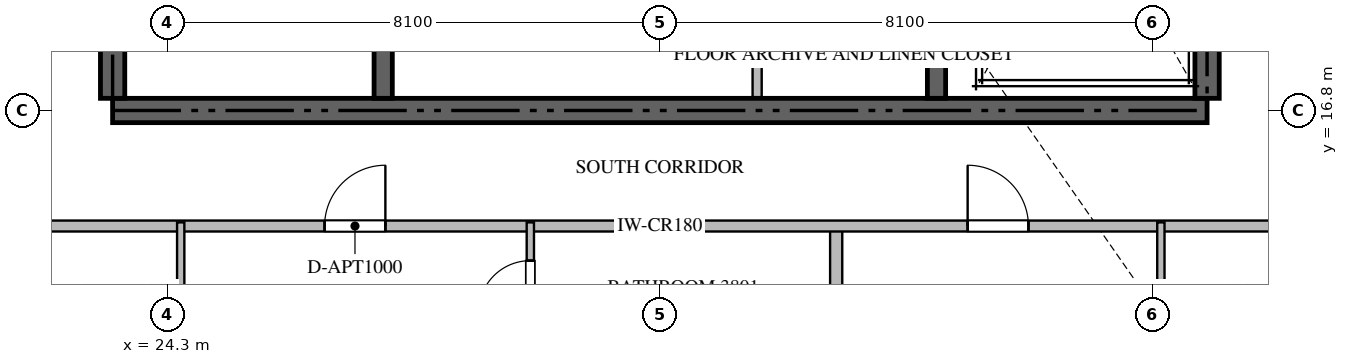
"""IFC4 building model, lengths in metres.
Left out: names, types, materials, properties, quantities, classifications, styles, units other than length and angle.
Written with IfcOpenShell. Run it as: python <this file> out.ifc"""

import sys

from ifc_helpers import new_model, si_unit, direction, frame, frame_2d, origin, place, context, subcontext, project, spatial, rectangle, extrude, source, transform, mapped, element, fill, save


model = new_model("IFC4")
c1 = context("Model", 3, precision=1e-05, world=origin(), true_north=direction((0.0, 1.0)))
c2 = subcontext(c1, "Body", "Model", "MODEL_VIEW")
j1 = project(units=[si_unit("LENGTHUNIT", "METRE"), si_unit("PLANEANGLEUNIT", "RADIAN")], contexts=[c1])
p1 = place(None, origin())
s1 = spatial("IfcSite", under=j1, at=p1, CompositionType="ELEMENT")
p2 = place(p1, origin())
s2 = spatial("IfcBuilding", under=s1, at=p2, CompositionType="ELEMENT")
p3 = place(p2, frame((0.0, 0.0, 153.9)))
s3 = spatial("IfcBuildingStorey", under=s2, at=p3, CompositionType="ELEMENT", Elevation=153.9)
p4 = place(p3, frame((23.4, 16.8, -0.26), z_axis=(0.0, 0.0, 1.0), x_axis=(1.0, 0.0, 0.0)))
e1 = element("IfcWall", 1, at=p4, inside=s3, PredefinedType="SHEAR", context=c2, shape_type="SweptSolid", body=[
    extrude(rectangle(XDim=18.0, YDim=0.4, at=frame_2d((9.0, 0.0))), origin(), (0.0, 0.0, 1.0), 3.748),
])
p5 = place(p3, frame((23.4, 17.0, -0.26), z_axis=(0.0, 0.0, 1.0), x_axis=(0.0, 1.0, 0.0)))
e2 = element("IfcWall", 2, at=p5, inside=s3, PredefinedType="SHEAR", context=c2, shape_type="SweptSolid", body=[
    extrude(rectangle(XDim=4.85, YDim=0.4, at=frame_2d((2.425, 0.0))), origin(), (0.0, 0.0, 1.0), 3.748),
])
p6 = place(p3, frame((41.4, 17.0, -0.26), z_axis=(0.0, 0.0, 1.0), x_axis=(0.0, 1.0, 0.0)))
e3 = element("IfcWall", 3, at=p6, inside=s3, PredefinedType="SHEAR", context=c2, shape_type="SweptSolid", body=[
    extrude(rectangle(XDim=8.35, YDim=0.4, at=frame_2d((4.175, 0.0))), origin(), (0.0, 0.0, 1.0), 3.748),
])
p7 = place(p3, frame((27.85, 17.0, -0.26), z_axis=(0.0, 0.0, 1.0), x_axis=(0.0, 1.0, 0.0)))
e4 = element("IfcWall", 4, at=p7, inside=s3, PredefinedType="SHEAR", context=c2, shape_type="SweptSolid", body=[
    extrude(rectangle(XDim=4.85, YDim=0.3, at=frame_2d((2.425, 0.0))), origin(), (0.0, 0.0, 1.0), 3.748),
])
p8 = place(p3, frame((36.95, 17.0, -0.26), z_axis=(0.0, 0.0, 1.0), x_axis=(0.0, 1.0, 0.0)))
e5 = element("IfcWall", 5, at=p8, inside=s3, PredefinedType="SHEAR", context=c2, shape_type="SweptSolid", body=[
    extrude(rectangle(XDim=8.35, YDim=0.3, at=frame_2d((4.175, 0.0))), origin(), (0.0, 0.0, 1.0), 3.748),
])
p9 = place(p3, frame((34.0, 17.02, 0.0), z_axis=(0.0, 0.0, 1.0), x_axis=(0.0, 1.0, 0.0)))
e6 = element("IfcWall", 6, at=p9, inside=s3, PredefinedType="PARTITIONING", context=c2, shape_type="SweptSolid", body=[
    extrude(rectangle(XDim=2.73, YDim=0.15, at=frame_2d((1.365, 0.0))), origin(), (0.0, 0.0, 1.0), 3.49),
])
p10 = place(p3, frame((35.3, 1.482, 0.0), z_axis=(0.0, 0.0, 1.0), x_axis=(0.0, 1.0, 0.0)))
e7 = element("IfcWall", 7, at=p10, inside=s3, PredefinedType="PARTITIONING", context=c2, shape_type="SweptSolid", body=[
    extrude(rectangle(XDim=13.418, YDim=0.2, at=frame_2d((6.709, 0.0))), origin(), (0.0, 0.0, 1.0), 3.49),
])
p11 = place(p3, frame((20.952, 14.9, 0.0), z_axis=(0.0, 0.0, 1.0), x_axis=(1.0, 0.0, 0.0)))
e8 = element("IfcWall", 8, at=p11, inside=s3, PredefinedType="PARTITIONING", context=c2, shape_type="SweptSolid", body=[
    extrude(rectangle(XDim=22.896, YDim=0.18, at=frame_2d((11.448, 0.0))), origin(), (0.0, 0.0, 1.0), 3.49),
])
p12 = place(p11, frame((5.934, 0.0, 0.0)))
e9 = element("IfcOpeningElement", 9, at=p12, cuts=e8, PredefinedType="OPENING", context=c2, shape_type="SweptSolid", body=[
    extrude(rectangle(XDim=1.0, YDim=2.15, at=frame_2d((0.5, 1.075))), frame((0.0, 0.1, 0.0), z_axis=(0.0, -1.0, 0.0), x_axis=(1.0, 0.0, 0.0)), (0.0, 0.0, 1.0), 0.2),
])
p13 = place(p11, frame((16.51, 0.0, 0.0)))
e10 = element("IfcOpeningElement", 10, at=p13, cuts=e8, PredefinedType="OPENING", context=c2, shape_type="SweptSolid", body=[
    extrude(rectangle(XDim=1.0, YDim=2.15, at=frame_2d((0.5, 1.075))), frame((0.0, 0.1, 0.0), z_axis=(0.0, -1.0, 0.0), x_axis=(1.0, 0.0, 0.0)), (0.0, 0.0, 1.0), 0.2),
])
p14 = place(p3, frame((24.52, 12.15, 0.0), z_axis=(0.0, 0.0, 1.0), x_axis=(0.0, 1.0, 0.0)))
e11 = element("IfcWall", 11, at=p14, inside=s3, PredefinedType="PARTITIONING", context=c2, shape_type="SweptSolid", body=[
    extrude(rectangle(XDim=2.81, YDim=0.12, at=frame_2d((1.405, 0.0))), origin(), (0.0, 0.0, 1.0), 3.49),
])
p15 = place(p3, frame((30.27, 12.852, 0.0), z_axis=(0.0, 0.0, 1.0), x_axis=(0.0, 1.0, 0.0)))
e12 = element("IfcWall", 12, at=p15, inside=s3, PredefinedType="PARTITIONING", context=c2, shape_type="SweptSolid", body=[
    extrude(rectangle(XDim=2.108, YDim=0.12, at=frame_2d((1.054, 0.0))), origin(), (0.0, 0.0, 1.0), 3.49),
])
p16 = place(p15, frame((0.629, 0.0, 0.0)))
e13 = element("IfcOpeningElement", 13, at=p16, cuts=e12, PredefinedType="OPENING", context=c2, shape_type="SweptSolid", body=[
    extrude(rectangle(XDim=0.85, YDim=2.1, at=frame_2d((0.425, 1.05))), frame((0.0, 0.07, 0.0), z_axis=(0.0, -1.0, 0.0), x_axis=(1.0, 0.0, 0.0)), (0.0, 0.0, 1.0), 0.14),
])
p17 = place(p3, frame((40.64, 12.15, 0.0), z_axis=(0.0, 0.0, 1.0), x_axis=(0.0, 1.0, 0.0)))
e14 = element("IfcWall", 14, at=p17, inside=s3, PredefinedType="PARTITIONING", context=c2, shape_type="SweptSolid", body=[
    extrude(rectangle(XDim=2.81, YDim=0.12, at=frame_2d((1.405, 0.0))), origin(), (0.0, 0.0, 1.0), 3.49),
])
m1 = source(origin(), c2, "Body", "SweptSolid", [
    extrude(rectangle(XDim=1.0, YDim=2.15, at=frame_2d((0.5, 1.075))), frame((0.0, 0.025, 0.0), z_axis=(0.0, -1.0, 0.0), x_axis=(1.0, 0.0, 0.0)), (0.0, 0.0, 1.0), 0.05),
])
p18 = place(p12, origin())
e15 = element("IfcDoor", 15, at=p18, inside=s3, OperationType="SINGLE_SWING_RIGHT", PredefinedType="DOOR", context=c2, shape_type="MappedRepresentation", body=[
    mapped(m1, transform((0.0, 0.0, 0.0), scale=1.0)),
])
fill(e9, e15)
p19 = place(p13, origin())
e16 = element("IfcDoor", 16, at=p19, inside=s3, OperationType="SINGLE_SWING_LEFT", PredefinedType="DOOR", context=c2, shape_type="MappedRepresentation", body=[
    mapped(m1, transform((0.0, 0.0, 0.0), scale=1.0)),
])
fill(e10, e16)
m2 = source(origin(), c2, "Body", "SweptSolid", [
    extrude(rectangle(XDim=0.85, YDim=2.1, at=frame_2d((0.425, 1.05))), frame((0.0, 0.025, 0.0), z_axis=(0.0, -1.0, 0.0), x_axis=(1.0, 0.0, 0.0)), (0.0, 0.0, 1.0), 0.05),
])
p20 = place(p16, origin())
e17 = element("IfcDoor", 17, at=p20, inside=s3, OperationType="SINGLE_SWING_LEFT", PredefinedType="DOOR", context=c2, shape_type="MappedRepresentation", body=[
    mapped(m2, transform((0.0, 0.0, 0.0), scale=1.0)),
])
fill(e13, e17)
save(model, sys.argv[1])
